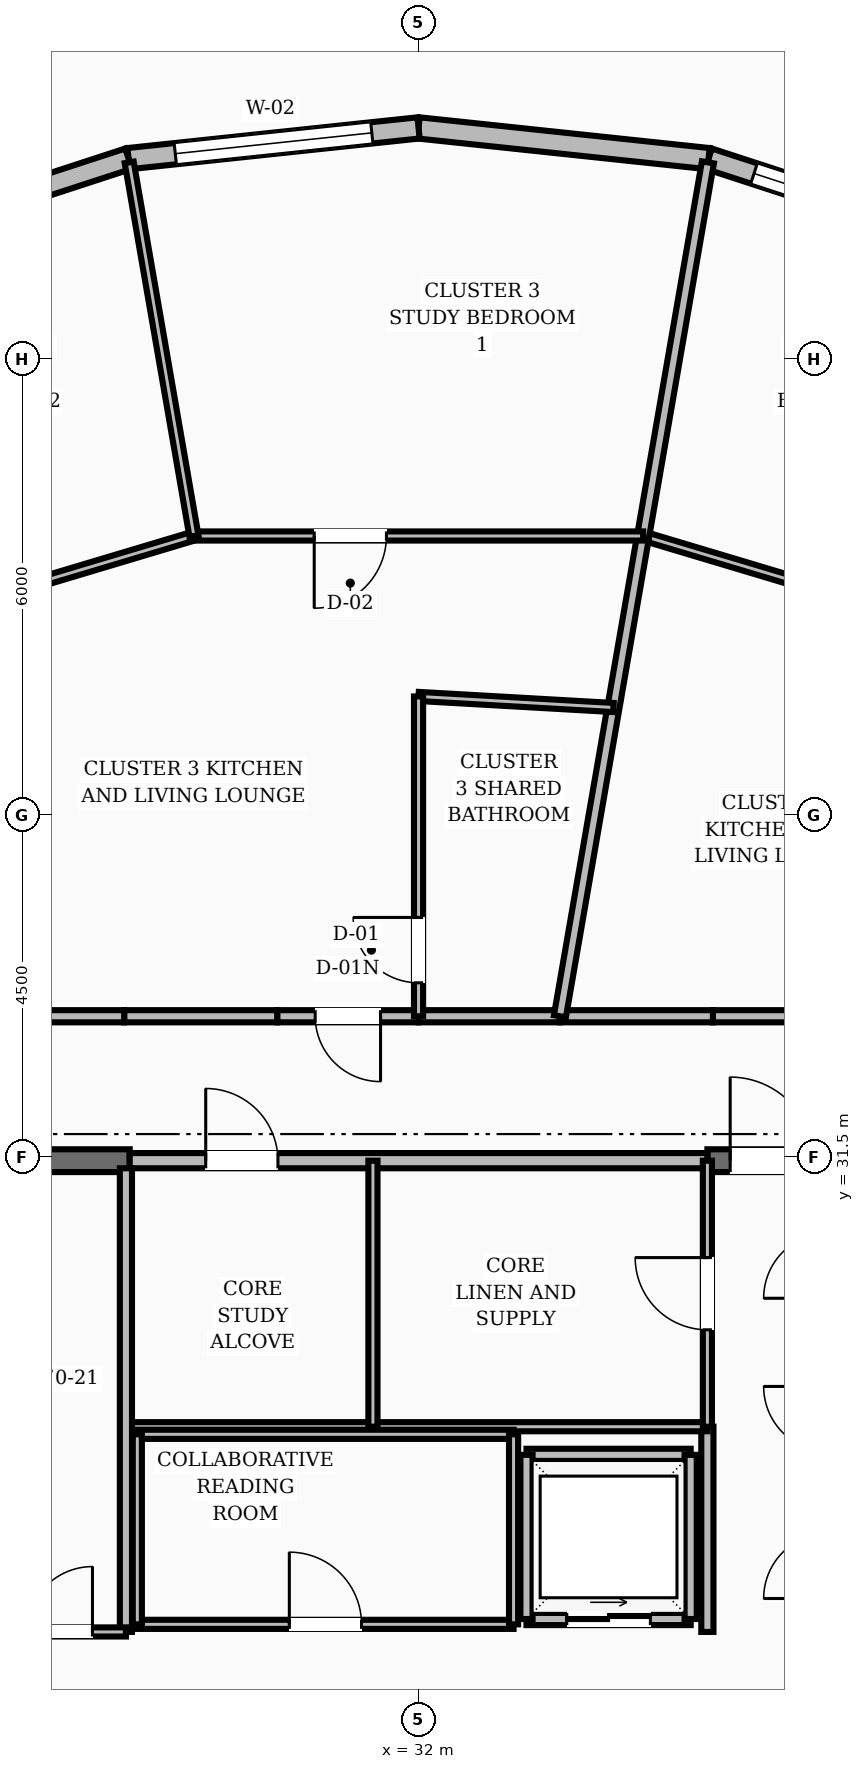
"""IFC4 building model, lengths in metres.
Left out: names, types, materials, properties, quantities, classifications, styles, units other than length and angle.
Written with IfcOpenShell. Run it as: python <this file> out.ifc"""

import sys

from ifc_helpers import new_model, si_unit, direction, frame, frame_2d, origin, place, context, subcontext, project, spatial, rectangle, extrude, element, fill, save


model = new_model("IFC4")
c1 = context("Model", 3, precision=1e-05, world=origin(), true_north=direction((0.0, 1.0)))
c2 = subcontext(c1, "Body", "Model", "MODEL_VIEW")
j1 = project(units=[si_unit("LENGTHUNIT", "METRE"), si_unit("PLANEANGLEUNIT", "RADIAN")], contexts=[c1])
p1 = place(None, origin())
s1 = spatial("IfcSite", under=j1, at=p1, CompositionType="ELEMENT")
p2 = place(p1, origin())
s2 = spatial("IfcBuilding", under=s1, at=p2, CompositionType="ELEMENT")
p3 = place(p2, frame((0.0, 0.0, 268.8)))
s3 = spatial("IfcBuildingStorey", under=s2, at=p3, CompositionType="ELEMENT", Elevation=268.8)
p4 = place(p3, frame((24.95, 31.45, 0.0), z_axis=(0.0, 0.0, 1.0), x_axis=(1.0, 0.0, 0.0)))
e1 = element("IfcWall", 1, at=p4, inside=s3, PredefinedType="SHEAR", context=c2, shape_type="SweptSolid", body=[
    extrude(rectangle(XDim=3.25, YDim=0.3, at=frame_2d((1.625, 0.0))), origin(), (0.0, 0.0, 1.0), 3.6),
])
p5 = place(p3, frame((35.8, 31.45, 0.0), z_axis=(0.0, 0.0, 1.0), x_axis=(1.0, 0.0, 0.0)))
e2 = element("IfcWall", 2, at=p5, inside=s3, PredefinedType="SHEAR", context=c2, shape_type="SweptSolid", body=[
    extrude(rectangle(XDim=3.25, YDim=0.3, at=frame_2d((1.625, 0.0))), origin(), (0.0, 0.0, 1.0), 3.6),
])
p6 = place(p5, frame((0.3, 0.0, 0.0)))
e3 = element("IfcOpeningElement", 3, at=p6, cuts=e2, PredefinedType="OPENING", context=c2, shape_type="SweptSolid", body=[
    extrude(rectangle(XDim=1.1, YDim=2.1, at=frame_2d((0.55, 1.05))), frame((0.0, 0.16, 0.0), z_axis=(0.0, -1.0, 0.0), x_axis=(1.0, 0.0, 0.0)), (0.0, 0.0, 1.0), 0.32),
])
p7 = place(p3, frame((39.484, 43.436, 0.0), z_axis=(0.0, 0.0, 1.0), x_axis=(-0.950681997555, 0.310167276684, 0.0)))
e4 = element("IfcWall", 4, at=p7, inside=s3, PredefinedType="STANDARD", context=c2, shape_type="SweptSolid", body=[
    extrude(rectangle(XDim=3.859, YDim=0.28, at=frame_2d((1.93, 0.0))), origin(), (0.0, 0.0, 1.0), 2.88),
])
p8 = place(p7, frame((0.63, 0.0, 0.8)))
e5 = element("IfcOpeningElement", 5, at=p8, cuts=e4, PredefinedType="OPENING", context=c2, shape_type="SweptSolid", body=[
    extrude(rectangle(XDim=2.6, YDim=1.65, at=frame_2d((1.3, 0.825))), frame((0.0, 0.15, 0.0), z_axis=(0.0, -1.0, 0.0), x_axis=(1.0, 0.0, 0.0)), (0.0, 0.0, 1.0), 0.3),
])
p9 = place(p3, frame((35.815, 44.633, 0.0), z_axis=(0.0, 0.0, 1.0), x_axis=(-0.99443198522, 0.105380390832, 0.0)))
e6 = element("IfcWall", 6, at=p9, inside=s3, PredefinedType="STANDARD", context=c2, shape_type="SweptSolid", body=[
    extrude(rectangle(XDim=3.836, YDim=0.28, at=frame_2d((1.918, 0.0))), origin(), (0.0, 0.0, 1.0), 2.88),
])
p10 = place(p3, frame((32.0, 45.037, 0.0), z_axis=(0.0, 0.0, 1.0), x_axis=(-0.99443198522, -0.105380390832, 0.0)))
e7 = element("IfcWall", 7, at=p10, inside=s3, PredefinedType="STANDARD", context=c2, shape_type="SweptSolid", body=[
    extrude(rectangle(XDim=3.836, YDim=0.28, at=frame_2d((1.918, 0.0))), origin(), (0.0, 0.0, 1.0), 2.88),
])
p11 = place(p10, frame((0.618, 0.0, 0.8)))
e8 = element("IfcOpeningElement", 8, at=p11, cuts=e7, PredefinedType="OPENING", context=c2, shape_type="SweptSolid", body=[
    extrude(rectangle(XDim=2.6, YDim=1.65, at=frame_2d((1.3, 0.825))), frame((0.0, 0.15, 0.0), z_axis=(0.0, -1.0, 0.0), x_axis=(1.0, 0.0, 0.0)), (0.0, 0.0, 1.0), 0.3),
])
p12 = place(p3, frame((28.185, 44.633, 0.0), z_axis=(0.0, 0.0, 1.0), x_axis=(-0.950681997555, -0.310167276684, 0.0)))
e9 = element("IfcWall", 9, at=p12, inside=s3, PredefinedType="STANDARD", context=c2, shape_type="SweptSolid", body=[
    extrude(rectangle(XDim=3.859, YDim=0.28, at=frame_2d((1.93, 0.0))), origin(), (0.0, 0.0, 1.0), 2.88),
])
p13 = place(p3, frame((35.8, 25.25, 0.0), z_axis=(0.0, 0.0, 1.0), x_axis=(0.0, 1.0, 0.0)))
e10 = element("IfcWall", 10, at=p13, inside=s3, PredefinedType="SOLIDWALL", context=c2, shape_type="SweptSolid", body=[
    extrude(rectangle(XDim=2.7, YDim=0.16, at=frame_2d((1.35, 0.0))), origin(), (0.0, 0.0, 1.0), 2.87),
])
p14 = place(p3, frame((33.42, 25.42, 0.0), z_axis=(0.0, 0.0, 1.0), x_axis=(1.0, 0.0, 0.0)))
e11 = element("IfcWall", 11, at=p14, inside=s3, PredefinedType="SOLIDWALL", context=c2, shape_type="SweptSolid", body=[
    extrude(rectangle(XDim=2.16, YDim=0.16, at=frame_2d((1.08, 0.0))), origin(), (0.0, 0.0, 1.0), 2.87),
])
p15 = place(p14, frame((0.53, 0.0, 0.0)))
e12 = element("IfcOpeningElement", 12, at=p15, cuts=e11, PredefinedType="OPENING", context=c2, shape_type="SweptSolid", body=[
    extrude(rectangle(XDim=1.1, YDim=2.15, at=frame_2d((0.55, 1.075))), frame((0.0, 0.09, 0.0), z_axis=(0.0, -1.0, 0.0), x_axis=(1.0, 0.0, 0.0)), (0.0, 0.0, 1.0), 0.18),
])
for number, where, z_axis, x_axis in (
    (13, (33.42, 27.58, 0.0), (0.0, 0.0, 1.0), (1.0, 0.0, 0.0)),
    (14, (33.42, 25.42, 0.0), (0.0, 0.0, 1.0), (0.0, 1.0, 0.0)),
    (15, (35.58, 25.42, 0.0), (0.0, 0.0, 1.0), (0.0, 1.0, 0.0)),
):
    element("IfcWall", number, at=place(p3, frame(where, z_axis=z_axis, x_axis=x_axis)), inside=s3, PredefinedType="SOLIDWALL", context=c2, shape_type="SweptSolid", body=[
        extrude(rectangle(XDim=2.16, YDim=0.16, at=frame_2d((1.08, 0.0))), origin(), (0.0, 0.0, 1.0), 2.87),
    ])
p16 = place(p3, frame((28.2, 31.45, 0.0), z_axis=(0.0, 0.0, 1.0), x_axis=(1.0, 0.0, 0.0)))
e16 = element("IfcWall", 16, at=p16, inside=s3, PredefinedType="SOLIDWALL", context=c2, shape_type="SweptSolid", body=[
    extrude(rectangle(XDim=7.6, YDim=0.2, at=frame_2d((3.8, 0.0))), origin(), (0.0, 0.0, 1.0), 2.87),
])
p17 = place(p16, frame((1.0, 0.0, 0.0)))
e17 = element("IfcOpeningElement", 17, at=p17, cuts=e16, PredefinedType="OPENING", context=c2, shape_type="SweptSolid", body=[
    extrude(rectangle(XDim=0.95, YDim=2.1, at=frame_2d((0.475, 1.05))), frame((0.0, 0.11, 0.0), z_axis=(0.0, -1.0, 0.0), x_axis=(1.0, 0.0, 0.0)), (0.0, 0.0, 1.0), 0.22),
])
p18 = place(p3, frame((28.2, 27.95, 0.0), z_axis=(0.0, 0.0, 1.0), x_axis=(1.0, 0.0, 0.0)))
e18 = element("IfcWall", 18, at=p18, inside=s3, PredefinedType="PARTITIONING", context=c2, shape_type="SweptSolid", body=[
    extrude(rectangle(XDim=7.6, YDim=0.12, at=frame_2d((3.8, 0.0))), origin(), (0.0, 0.0, 1.0), 2.87),
])
p19 = place(p3, frame((35.8, 27.95, 0.0), z_axis=(0.0, 0.0, 1.0), x_axis=(0.0, 1.0, 0.0)))
e19 = element("IfcWall", 19, at=p19, inside=s3, PredefinedType="PARTITIONING", context=c2, shape_type="SweptSolid", body=[
    extrude(rectangle(XDim=3.5, YDim=0.12, at=frame_2d((1.75, 0.0))), origin(), (0.0, 0.0, 1.0), 2.87),
])
p20 = place(p19, frame((1.275, 0.0, 0.0)))
e20 = element("IfcOpeningElement", 20, at=p20, cuts=e19, PredefinedType="OPENING", context=c2, shape_type="SweptSolid", body=[
    extrude(rectangle(XDim=0.95, YDim=2.1, at=frame_2d((0.475, 1.05))), frame((0.0, 0.07, 0.0), z_axis=(0.0, -1.0, 0.0), x_axis=(1.0, 0.0, 0.0)), (0.0, 0.0, 1.0), 0.14),
])
p21 = place(p3, frame((31.4, 27.95, 0.0), z_axis=(0.0, 0.0, 1.0), x_axis=(0.0, 1.0, 0.0)))
e21 = element("IfcWall", 21, at=p21, inside=s3, PredefinedType="PARTITIONING", context=c2, shape_type="SweptSolid", body=[
    extrude(rectangle(XDim=3.5, YDim=0.12, at=frame_2d((1.75, 0.0))), origin(), (0.0, 0.0, 1.0), 2.87),
])
p22 = place(p3, frame((28.3, 25.35, 0.0), z_axis=(0.0, 0.0, 1.0), x_axis=(1.0, 0.0, 0.0)))
e22 = element("IfcWall", 22, at=p22, inside=s3, PredefinedType="PARTITIONING", context=c2, shape_type="SweptSolid", body=[
    extrude(rectangle(XDim=4.95, YDim=0.12, at=frame_2d((2.475, 0.0))), origin(), (0.0, 0.0, 1.0), 2.87),
])
p23 = place(p22, frame((2.0, 0.0, 0.0)))
e23 = element("IfcOpeningElement", 23, at=p23, cuts=e22, PredefinedType="OPENING", context=c2, shape_type="SweptSolid", body=[
    extrude(rectangle(XDim=0.95, YDim=2.1, at=frame_2d((0.475, 1.05))), frame((0.0, 0.07, 0.0), z_axis=(0.0, -1.0, 0.0), x_axis=(1.0, 0.0, 0.0)), (0.0, 0.0, 1.0), 0.14),
])
p24 = place(p3, frame((28.3, 27.85, 0.0), z_axis=(0.0, 0.0, 1.0), x_axis=(1.0, 0.0, 0.0)))
e24 = element("IfcWall", 24, at=p24, inside=s3, PredefinedType="PARTITIONING", context=c2, shape_type="SweptSolid", body=[
    extrude(rectangle(XDim=4.95, YDim=0.12, at=frame_2d((2.475, 0.0))), origin(), (0.0, 0.0, 1.0), 2.87),
])
for number, where, z_axis, x_axis in (
    (25, (28.3, 25.35, 0.0), (0.0, 0.0, 1.0), (0.0, 1.0, 0.0)),
    (26, (33.25, 25.35, 0.0), (0.0, 0.0, 1.0), (0.0, 1.0, 0.0)),
):
    element("IfcWall", number, at=place(p3, frame(where, z_axis=z_axis, x_axis=x_axis)), inside=s3, PredefinedType="PARTITIONING", context=c2, shape_type="SweptSolid", body=[
        extrude(rectangle(XDim=2.5, YDim=0.12, at=frame_2d((1.25, 0.0))), origin(), (0.0, 0.0, 1.0), 2.87),
    ])
p25 = place(p3, frame((28.15, 25.25, 0.0), z_axis=(0.0, 0.0, 1.0), x_axis=(0.0, 1.0, 0.0)))
e27 = element("IfcWall", 27, at=p25, inside=s3, PredefinedType="SOLIDWALL", context=c2, shape_type="SweptSolid", body=[
    extrude(rectangle(XDim=6.1, YDim=0.16, at=frame_2d((3.05, 0.0))), origin(), (0.0, 0.0, 1.0), 2.87),
])
p26 = place(p3, frame((24.95, 25.25, 0.0), z_axis=(0.0, 0.0, 1.0), x_axis=(1.0, 0.0, 0.0)))
e28 = element("IfcWall", 28, at=p26, inside=s3, PredefinedType="PARTITIONING", context=c2, shape_type="SweptSolid", body=[
    extrude(rectangle(XDim=3.2, YDim=0.12, at=frame_2d((1.6, 0.0))), origin(), (0.0, 0.0, 1.0), 2.87),
])
p27 = place(p26, frame((0.44, 0.0, 0.0)))
e29 = element("IfcOpeningElement", 29, at=p27, cuts=e28, PredefinedType="OPENING", context=c2, shape_type="SweptSolid", body=[
    extrude(rectangle(XDim=0.86, YDim=2.1, at=frame_2d((0.43, 1.05))), frame((0.0, 0.07, 0.0), z_axis=(0.0, -1.0, 0.0), x_axis=(1.0, 0.0, 0.0)), (0.0, 0.0, 1.0), 0.14),
])
p28 = place(p26, frame((1.9, 0.0, 0.0)))
e30 = element("IfcOpeningElement", 30, at=p28, cuts=e28, PredefinedType="OPENING", context=c2, shape_type="SweptSolid", body=[
    extrude(rectangle(XDim=0.86, YDim=2.1, at=frame_2d((0.43, 1.05))), frame((0.0, 0.07, 0.0), z_axis=(0.0, -1.0, 0.0), x_axis=(1.0, 0.0, 0.0)), (0.0, 0.0, 1.0), 0.14),
])
p29 = place(p3, frame((38.248, 33.35, 0.0), z_axis=(0.0, 0.0, 1.0), x_axis=(-1.0, 0.0, 0.0)))
e31 = element("IfcWall", 31, at=p29, inside=s3, PredefinedType="SOLIDWALL", context=c2, shape_type="SweptSolid", body=[
    extrude(rectangle(XDim=2.375, YDim=0.16, at=frame_2d((1.188, 0.0))), origin(), (0.0, 0.0, 1.0), 2.87),
])
p30 = place(p3, frame((35.873, 33.35, 0.0), z_axis=(0.0, 0.0, 1.0), x_axis=(-1.0, 0.0, 0.0)))
e32 = element("IfcWall", 32, at=p30, inside=s3, PredefinedType="SOLIDWALL", context=c2, shape_type="SweptSolid", body=[
    extrude(rectangle(XDim=2.013, YDim=0.16, at=frame_2d((1.006, 0.0))), origin(), (0.0, 0.0, 1.0), 2.87),
])
p31 = place(p3, frame((33.86, 33.35, 0.0), z_axis=(0.0, 0.0, 1.0), x_axis=(-1.0, 0.0, 0.0)))
e33 = element("IfcWall", 33, at=p31, inside=s3, PredefinedType="SOLIDWALL", context=c2, shape_type="SweptSolid", body=[
    extrude(rectangle(XDim=1.86, YDim=0.16, at=frame_2d((0.93, 0.0))), origin(), (0.0, 0.0, 1.0), 2.87),
])
p32 = place(p3, frame((32.0, 33.35, 0.0), z_axis=(0.0, 0.0, 1.0), x_axis=(-1.0, 0.0, 0.0)))
e34 = element("IfcWall", 34, at=p32, inside=s3, PredefinedType="SOLIDWALL", context=c2, shape_type="SweptSolid", body=[
    extrude(rectangle(XDim=1.86, YDim=0.16, at=frame_2d((0.93, 0.0))), origin(), (0.0, 0.0, 1.0), 2.87),
])
p33 = place(p32, frame((0.5, 0.0, 0.0)))
e35 = element("IfcOpeningElement", 35, at=p33, cuts=e34, PredefinedType="OPENING", context=c2, shape_type="SweptSolid", body=[
    extrude(rectangle(XDim=0.86, YDim=2.1, at=frame_2d((0.43, 1.05))), frame((0.0, 0.09, 0.0), z_axis=(0.0, -1.0, 0.0), x_axis=(1.0, 0.0, 0.0)), (0.0, 0.0, 1.0), 0.18),
])
p34 = place(p3, frame((30.14, 33.35, 0.0), z_axis=(0.0, 0.0, 1.0), x_axis=(-1.0, 0.0, 0.0)))
e36 = element("IfcWall", 36, at=p34, inside=s3, PredefinedType="SOLIDWALL", context=c2, shape_type="SweptSolid", body=[
    extrude(rectangle(XDim=2.013, YDim=0.16, at=frame_2d((1.006, 0.0))), origin(), (0.0, 0.0, 1.0), 2.87),
])
p35 = place(p3, frame((28.127, 33.35, 0.0), z_axis=(0.0, 0.0, 1.0), x_axis=(-1.0, 0.0, 0.0)))
e37 = element("IfcWall", 37, at=p35, inside=s3, PredefinedType="SOLIDWALL", context=c2, shape_type="SweptSolid", body=[
    extrude(rectangle(XDim=2.375, YDim=0.16, at=frame_2d((1.188, 0.0))), origin(), (0.0, 0.0, 1.0), 2.87),
])
p36 = place(p3, frame((40.833, 37.909, 0.0), z_axis=(0.0, 0.0, 1.0), x_axis=(-0.958019889786, 0.28670174533, 0.0)))
e38 = element("IfcWall", 38, at=p36, inside=s3, PredefinedType="PARTITIONING", context=c2, shape_type="SweptSolid", body=[
    extrude(rectangle(XDim=6.136, YDim=0.12, at=frame_2d((3.068, 0.0))), origin(), (0.0, 0.0, 1.0), 2.87),
])
p37 = place(p36, frame((2.593, 0.0, 0.0)))
e39 = element("IfcOpeningElement", 39, at=p37, cuts=e38, PredefinedType="OPENING", context=c2, shape_type="SweptSolid", body=[
    extrude(rectangle(XDim=0.95, YDim=2.1, at=frame_2d((0.475, 1.05))), frame((0.0, 0.07, 0.0), z_axis=(0.0, -1.0, 0.0), x_axis=(1.0, 0.0, 0.0)), (0.0, 0.0, 1.0), 0.14),
])
p38 = place(p3, frame((33.86, 33.35, 0.0), z_axis=(0.0, 0.0, 1.0), x_axis=(0.170778130505, 0.98530950982, 0.0)))
e40 = element("IfcWall", 40, at=p38, inside=s3, PredefinedType="SOLIDWALL", context=c2, shape_type="SweptSolid", body=[
    extrude(rectangle(XDim=11.401, YDim=0.16, at=frame_2d((5.7, 0.0))), origin(), (0.0, 0.0, 1.0), 2.87),
])
p39 = place(p3, frame((34.564, 37.412, 0.0), z_axis=(0.0, 0.0, 1.0), x_axis=(-0.998393230763, 0.056665304784, 0.0)))
e41 = element("IfcWall", 41, at=p39, inside=s3, PredefinedType="PARTITIONING", context=c2, shape_type="SweptSolid", body=[
    extrude(rectangle(XDim=2.568, YDim=0.12, at=frame_2d((1.284, 0.0))), origin(), (0.0, 0.0, 1.0), 2.87),
])
p40 = place(p3, frame((32.0, 33.35, 0.0), z_axis=(0.0, 0.0, 1.0), x_axis=(0.0, 1.0, 0.0)))
e42 = element("IfcWall", 42, at=p40, inside=s3, PredefinedType="PARTITIONING", context=c2, shape_type="SweptSolid", body=[
    extrude(rectangle(XDim=4.207, YDim=0.12, at=frame_2d((2.104, 0.0))), origin(), (0.0, 0.0, 1.0), 2.87),
])
p41 = place(p40, frame((0.44, 0.0, 0.0)))
e43 = element("IfcOpeningElement", 43, at=p41, cuts=e42, PredefinedType="OPENING", context=c2, shape_type="SweptSolid", body=[
    extrude(rectangle(XDim=0.86, YDim=2.1, at=frame_2d((0.43, 1.05))), frame((0.0, 0.07, 0.0), z_axis=(0.0, -1.0, 0.0), x_axis=(1.0, 0.0, 0.0)), (0.0, 0.0, 1.0), 0.14),
])
p42 = place(p3, frame((34.955, 39.668, 0.0), z_axis=(0.0, 0.0, 1.0), x_axis=(-1.0, 0.0, 0.0)))
e44 = element("IfcWall", 44, at=p42, inside=s3, PredefinedType="PARTITIONING", context=c2, shape_type="SweptSolid", body=[
    extrude(rectangle(XDim=5.91, YDim=0.12, at=frame_2d((2.955, 0.0))), origin(), (0.0, 0.0, 1.0), 2.87),
])
p43 = place(p42, frame((3.377, 0.0, 0.0)))
e45 = element("IfcOpeningElement", 45, at=p43, cuts=e44, PredefinedType="OPENING", context=c2, shape_type="SweptSolid", body=[
    extrude(rectangle(XDim=0.95, YDim=2.1, at=frame_2d((0.475, 1.05))), frame((0.0, 0.07, 0.0), z_axis=(0.0, -1.0, 0.0), x_axis=(1.0, 0.0, 0.0)), (0.0, 0.0, 1.0), 0.14),
])
p44 = place(p3, frame((29.045, 39.668, 0.0), z_axis=(0.0, 0.0, 1.0), x_axis=(-0.958019889786, -0.28670174533, 0.0)))
e46 = element("IfcWall", 46, at=p44, inside=s3, PredefinedType="PARTITIONING", context=c2, shape_type="SweptSolid", body=[
    extrude(rectangle(XDim=6.136, YDim=0.12, at=frame_2d((3.068, 0.0))), origin(), (0.0, 0.0, 1.0), 2.87),
])
p45 = place(p44, frame((2.593, 0.0, 0.0)))
e47 = element("IfcOpeningElement", 47, at=p45, cuts=e46, PredefinedType="OPENING", context=c2, shape_type="SweptSolid", body=[
    extrude(rectangle(XDim=0.95, YDim=2.1, at=frame_2d((0.475, 1.05))), frame((0.0, 0.07, 0.0), z_axis=(0.0, -1.0, 0.0), x_axis=(1.0, 0.0, 0.0)), (0.0, 0.0, 1.0), 0.14),
])
p46 = place(p3, frame((29.045, 39.668, 0.0), z_axis=(0.0, 0.0, 1.0), x_axis=(-0.170808263467, 0.985304286569, 0.0)))
e48 = element("IfcWall", 48, at=p46, inside=s3, PredefinedType="PARTITIONING", context=c2, shape_type="SweptSolid", body=[
    extrude(rectangle(XDim=4.988, YDim=0.12, at=frame_2d((2.494, 0.0))), origin(), (0.0, 0.0, 1.0), 2.87),
])
p47 = place(p8, origin())
e49 = element("IfcWindow", 49, at=p47, inside=s3, PartitioningType="SINGLE_PANEL", PredefinedType="WINDOW", context=c2, shape_type="SweptSolid", body=[
    extrude(rectangle(XDim=2.6, YDim=1.65, at=frame_2d((1.3, 0.825))), frame((0.0, 0.03, 0.0), z_axis=(0.0, -1.0, 0.0), x_axis=(1.0, 0.0, 0.0)), (0.0, 0.0, 1.0), 0.06),
])
fill(e5, e49)
p48 = place(p11, origin())
e50 = element("IfcWindow", 50, at=p48, inside=s3, PartitioningType="SINGLE_PANEL", PredefinedType="WINDOW", context=c2, shape_type="SweptSolid", body=[
    extrude(rectangle(XDim=2.6, YDim=1.65, at=frame_2d((1.3, 0.825))), frame((0.0, 0.03, 0.0), z_axis=(0.0, -1.0, 0.0), x_axis=(1.0, 0.0, 0.0)), (0.0, 0.0, 1.0), 0.06),
])
fill(e8, e50)
p49 = place(p6, origin())
e51 = element("IfcDoor", 51, at=p49, inside=s3, OperationType="SINGLE_SWING_LEFT", PredefinedType="DOOR", context=c2, shape_type="SweptSolid", body=[
    extrude(rectangle(XDim=1.1, YDim=2.1, at=frame_2d((0.55, 1.05))), frame((0.0, 0.025, 0.0), z_axis=(0.0, -1.0, 0.0), x_axis=(1.0, 0.0, 0.0)), (0.0, 0.0, 1.0), 0.05),
])
fill(e3, e51)
p50 = place(p15, origin())
e52 = element("IfcDoor", 52, at=p50, inside=s3, OperationType="SLIDING_TO_RIGHT", PredefinedType="DOOR", context=c2, shape_type="SweptSolid", body=[
    extrude(rectangle(XDim=1.1, YDim=2.15, at=frame_2d((0.55, 1.075))), frame((0.0, 0.025, 0.0), z_axis=(0.0, -1.0, 0.0), x_axis=(1.0, 0.0, 0.0)), (0.0, 0.0, 1.0), 0.05),
])
fill(e12, e52)
p51 = place(p17, origin())
e53 = element("IfcDoor", 53, at=p51, inside=s3, OperationType="SINGLE_SWING_LEFT", PredefinedType="DOOR", context=c2, shape_type="SweptSolid", body=[
    extrude(rectangle(XDim=0.95, YDim=2.1, at=frame_2d((0.475, 1.05))), frame((0.0, 0.025, 0.0), z_axis=(0.0, -1.0, 0.0), x_axis=(1.0, 0.0, 0.0)), (0.0, 0.0, 1.0), 0.05),
])
fill(e17, e53)
p52 = place(p20, origin())
e54 = element("IfcDoor", 54, at=p52, inside=s3, OperationType="SINGLE_SWING_RIGHT", PredefinedType="DOOR", context=c2, shape_type="SweptSolid", body=[
    extrude(rectangle(XDim=0.95, YDim=2.1, at=frame_2d((0.475, 1.05))), frame((0.0, 0.025, 0.0), z_axis=(0.0, -1.0, 0.0), x_axis=(1.0, 0.0, 0.0)), (0.0, 0.0, 1.0), 0.05),
])
fill(e20, e54)
p53 = place(p23, origin())
e55 = element("IfcDoor", 55, at=p53, inside=s3, OperationType="SINGLE_SWING_LEFT", PredefinedType="DOOR", context=c2, shape_type="SweptSolid", body=[
    extrude(rectangle(XDim=0.95, YDim=2.1, at=frame_2d((0.475, 1.05))), frame((0.0, 0.025, 0.0), z_axis=(0.0, -1.0, 0.0), x_axis=(1.0, 0.0, 0.0)), (0.0, 0.0, 1.0), 0.05),
])
fill(e23, e55)
p54 = place(p28, origin())
e56 = element("IfcDoor", 56, at=p54, inside=s3, OperationType="SINGLE_SWING_RIGHT", PredefinedType="DOOR", context=c2, shape_type="SweptSolid", body=[
    extrude(rectangle(XDim=0.86, YDim=2.1, at=frame_2d((0.43, 1.05))), frame((0.0, 0.025, 0.0), z_axis=(0.0, -1.0, 0.0), x_axis=(1.0, 0.0, 0.0)), (0.0, 0.0, 1.0), 0.05),
])
fill(e30, e56)
p55 = place(p41, origin())
e57 = element("IfcDoor", 57, at=p55, inside=s3, OperationType="SINGLE_SWING_RIGHT", PredefinedType="DOOR", context=c2, shape_type="SweptSolid", body=[
    extrude(rectangle(XDim=0.86, YDim=2.1, at=frame_2d((0.43, 1.05))), frame((0.0, 0.025, 0.0), z_axis=(0.0, -1.0, 0.0), x_axis=(1.0, 0.0, 0.0)), (0.0, 0.0, 1.0), 0.05),
])
fill(e43, e57)
p56 = place(p33, origin())
e58 = element("IfcDoor", 58, at=p56, inside=s3, OperationType="SINGLE_SWING_LEFT", PredefinedType="DOOR", context=c2, shape_type="SweptSolid", body=[
    extrude(rectangle(XDim=0.86, YDim=2.1, at=frame_2d((0.43, 1.05))), frame((0.0, 0.025, 0.0), z_axis=(0.0, -1.0, 0.0), x_axis=(1.0, 0.0, 0.0)), (0.0, 0.0, 1.0), 0.05),
])
fill(e35, e58)
p57 = place(p43, origin())
e59 = element("IfcDoor", 59, at=p57, inside=s3, OperationType="SINGLE_SWING_RIGHT", PredefinedType="DOOR", context=c2, shape_type="SweptSolid", body=[
    extrude(rectangle(XDim=0.95, YDim=2.1, at=frame_2d((0.475, 1.05))), frame((0.0, 0.025, 0.0), z_axis=(0.0, -1.0, 0.0), x_axis=(1.0, 0.0, 0.0)), (0.0, 0.0, 1.0), 0.05),
])
fill(e45, e59)
save(model, sys.argv[1])
